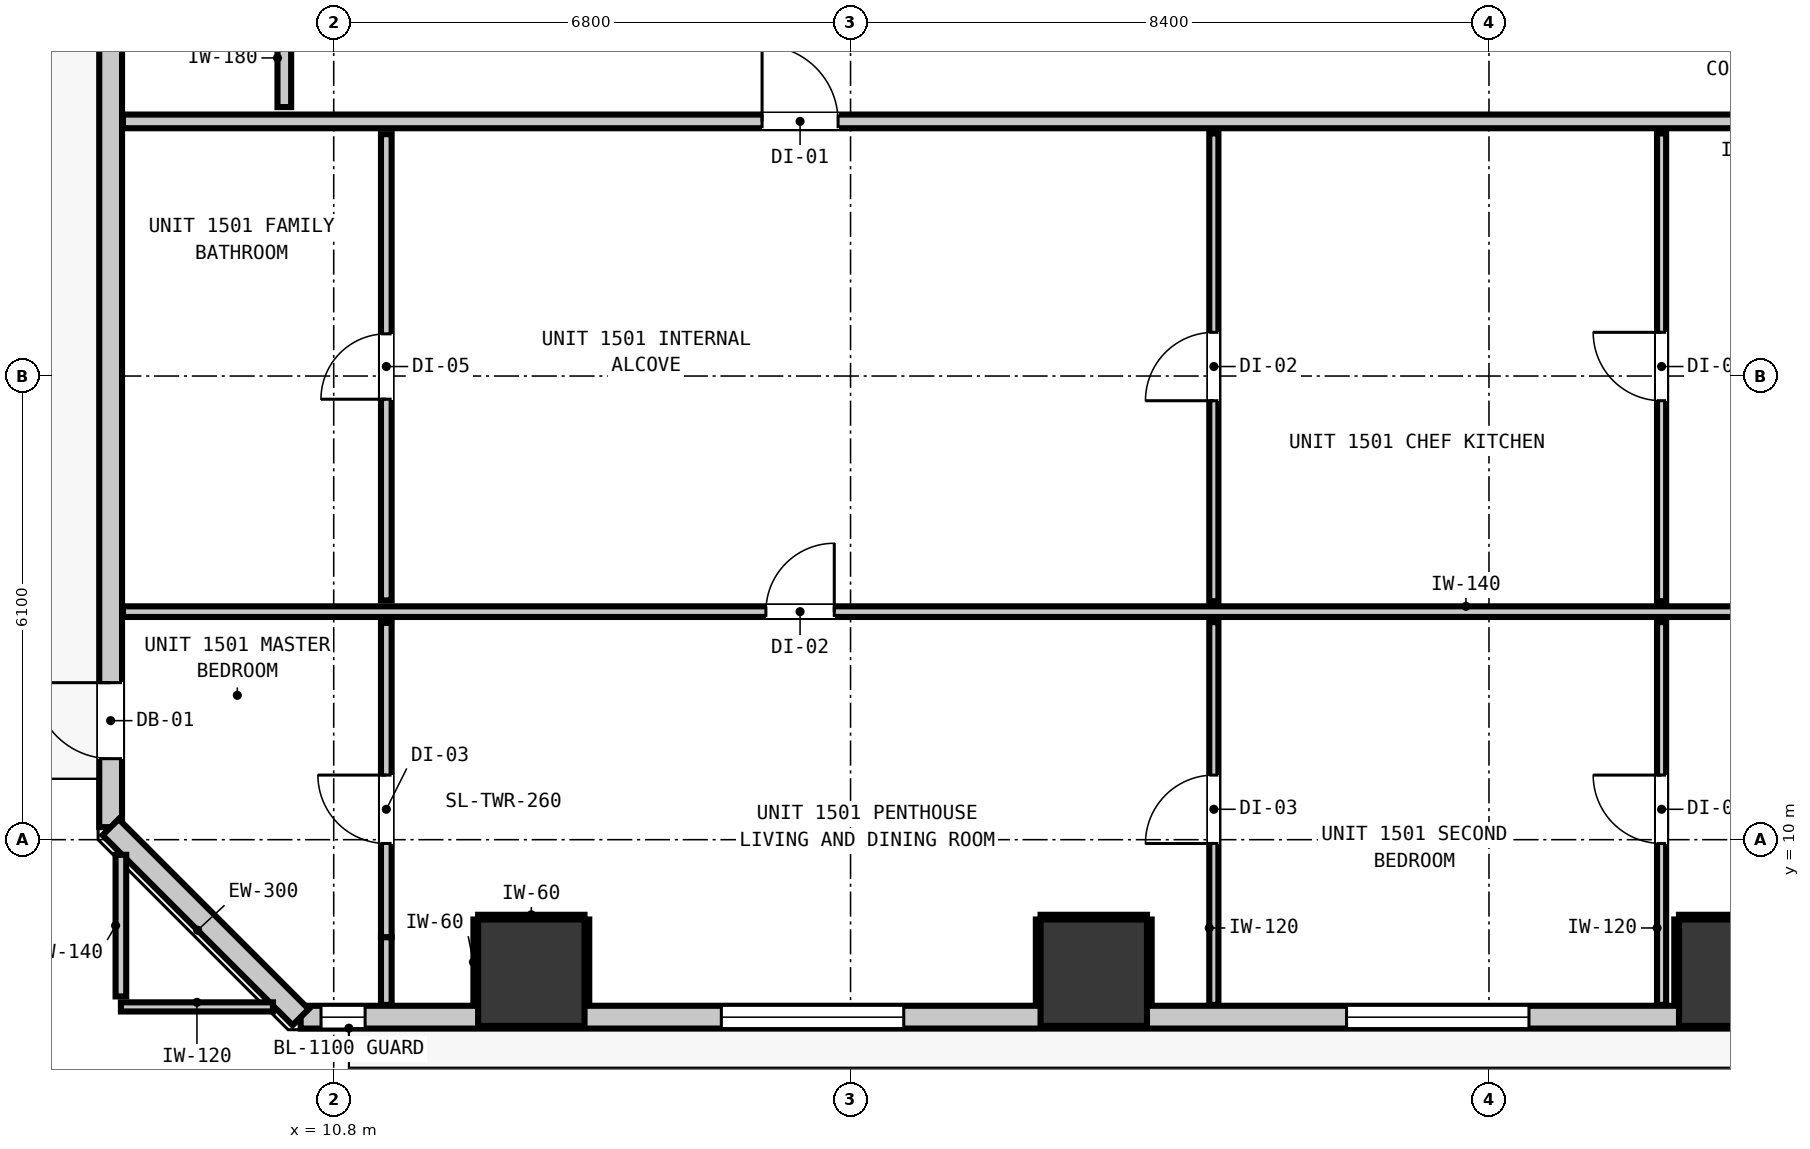
"""IFC4 building model, lengths in metres.
Left out: names, types, materials, properties, quantities, classifications, styles, units other than length and angle.
Written with IfcOpenShell. Run it as: python <this file> out.ifc"""

import sys

from ifc_helpers import new_model, si_unit, direction, frame, frame_2d, origin, origin_2d, place, context, subcontext, project, spatial, rectangle, extrude, element, fill, save


model = new_model("IFC4")
c1 = context("Model", 3, precision=1e-05, world=origin(), true_north=direction((0.0, 1.0)))
c2 = subcontext(c1, "Body", "Model", "MODEL_VIEW")
j1 = project(units=[si_unit("LENGTHUNIT", "METRE"), si_unit("PLANEANGLEUNIT", "RADIAN")], contexts=[c1])
p1 = place(None, origin())
s1 = spatial("IfcSite", under=j1, at=p1, CompositionType="ELEMENT")
p2 = place(p1, origin())
s2 = spatial("IfcBuilding", under=s1, at=p2, CompositionType="ELEMENT")
p3 = place(p2, frame((0.0, 0.0, 55.2)))
s3 = spatial("IfcBuildingStorey", under=s2, at=p3, CompositionType="ELEMENT", Elevation=55.2)
for number, where, z_axis, x_axis in (
    (1, (13.4, 8.25, 0.0), (0.0, 0.0, 1.0), (1.0, 0.0, 0.0)),
    (2, (20.8, 8.25, 0.0), (0.0, 0.0, 1.0), (1.0, 0.0, 0.0)),
    (3, (29.2, 8.25, 0.0), (0.0, 0.0, 1.0), (1.0, 0.0, 0.0)),
):
    element("IfcColumn", number, at=place(p3, frame(where, z_axis=z_axis, x_axis=x_axis)), inside=s3, PredefinedType="COLUMN", context=c2, shape_type="SweptSolid", body=[
        extrude(rectangle(XDim=1.4, YDim=1.4, at=origin_2d()), origin(), (0.0, 0.0, 1.0), 3.32),
    ])
p4 = place(p3, frame((7.865, 10.165, 0.0), z_axis=(0.0, 0.0, 1.0), x_axis=(0.0, 1.0, 0.0)))
e4 = element("IfcWall", 4, at=p4, inside=s3, PredefinedType="STANDARD", context=c2, shape_type="SweptSolid", body=[
    extrude(rectangle(XDim=34.67, YDim=0.3, at=frame_2d((17.335, 0.0))), origin(), (0.0, 0.0, 1.0), 3.06),
])
p5 = place(p4, frame((0.901, 0.0, 0.0)))
e5 = element("IfcOpeningElement", 5, at=p5, cuts=e4, PredefinedType="OPENING", context=c2, shape_type="SweptSolid", body=[
    extrude(rectangle(XDim=1.0, YDim=2.15, at=frame_2d((0.5, 1.075))), frame((0.0, 0.16, 0.0), z_axis=(0.0, -1.0, 0.0), x_axis=(1.0, 0.0, 0.0)), (0.0, 0.0, 1.0), 0.32),
])
p6 = place(p4, frame((32.708, 0.0, 0.85)))
e6 = element("IfcOpeningElement", 6, at=p6, cuts=e4, PredefinedType="OPENING", context=c2, shape_type="SweptSolid", body=[
    extrude(rectangle(XDim=1.05, YDim=1.65, at=frame_2d((0.525, 0.825))), frame((0.0, 0.16, 0.0), z_axis=(0.0, -1.0, 0.0), x_axis=(1.0, 0.0, 0.0)), (0.0, 0.0, 1.0), 0.32),
])
p7 = place(p3, frame((47.835, 7.665, 0.0), z_axis=(0.0, 0.0, 1.0), x_axis=(-1.0, 0.0, 0.0)))
e7 = element("IfcWall", 7, at=p7, inside=s3, PredefinedType="STANDARD", context=c2, shape_type="SweptSolid", body=[
    extrude(rectangle(XDim=37.47, YDim=0.3, at=frame_2d((18.735, 0.0))), origin(), (0.0, 0.0, 1.0), 3.06),
])
p8 = place(p7, frame((0.901, 0.0, 0.0)))
e8 = element("IfcOpeningElement", 8, at=p8, cuts=e7, PredefinedType="OPENING", context=c2, shape_type="SweptSolid", body=[
    extrude(rectangle(XDim=1.0, YDim=2.15, at=frame_2d((0.5, 1.075))), frame((0.0, 0.16, 0.0), z_axis=(0.0, -1.0, 0.0), x_axis=(1.0, 0.0, 0.0)), (0.0, 0.0, 1.0), 0.32),
])
p9 = place(p7, frame((29.535, 0.0, 0.85)))
e9 = element("IfcOpeningElement", 9, at=p9, cuts=e7, PredefinedType="OPENING", context=c2, shape_type="SweptSolid", body=[
    extrude(rectangle(XDim=2.4, YDim=1.95, at=frame_2d((1.2, 0.975))), frame((0.0, 0.16, 0.0), z_axis=(0.0, -1.0, 0.0), x_axis=(1.0, 0.0, 0.0)), (0.0, 0.0, 1.0), 0.32),
])
p10 = place(p7, frame((36.622, 0.0, 0.85)))
e10 = element("IfcOpeningElement", 10, at=p10, cuts=e7, PredefinedType="OPENING", context=c2, shape_type="SweptSolid", body=[
    extrude(rectangle(XDim=0.58, YDim=1.5, at=frame_2d((0.29, 0.75))), frame((0.0, 0.16, 0.0), z_axis=(0.0, -1.0, 0.0), x_axis=(1.0, 0.0, 0.0)), (0.0, 0.0, 1.0), 0.32),
])
p11 = place(p7, frame((21.309, 0.0, 0.85)))
e11 = element("IfcOpeningElement", 11, at=p11, cuts=e7, PredefinedType="OPENING", context=c2, shape_type="SweptSolid", body=[
    extrude(rectangle(XDim=2.4, YDim=1.95, at=frame_2d((1.2, 0.975))), frame((0.0, 0.16, 0.0), z_axis=(0.0, -1.0, 0.0), x_axis=(1.0, 0.0, 0.0)), (0.0, 0.0, 1.0), 0.32),
])
p12 = place(p7, frame((14.781, 0.0, 0.85)))
e12 = element("IfcOpeningElement", 12, at=p12, cuts=e7, PredefinedType="OPENING", context=c2, shape_type="SweptSolid", body=[
    extrude(rectangle(XDim=2.4, YDim=1.95, at=frame_2d((1.2, 0.975))), frame((0.0, 0.16, 0.0), z_axis=(0.0, -1.0, 0.0), x_axis=(1.0, 0.0, 0.0)), (0.0, 0.0, 1.0), 0.32),
])
p13 = place(p7, frame((5.168, 0.0, 0.85)))
e13 = element("IfcOpeningElement", 13, at=p13, cuts=e7, PredefinedType="OPENING", context=c2, shape_type="SweptSolid", body=[
    extrude(rectangle(XDim=2.4, YDim=1.95, at=frame_2d((1.2, 0.975))), frame((0.0, 0.16, 0.0), z_axis=(0.0, -1.0, 0.0), x_axis=(1.0, 0.0, 0.0)), (0.0, 0.0, 1.0), 0.32),
])
p14 = place(p3, frame((10.365, 7.665, 0.0), z_axis=(0.0, 0.0, 1.0), x_axis=(-0.707106781187, 0.707106781187, 0.0)))
e14 = element("IfcWall", 14, at=p14, inside=s3, PredefinedType="STANDARD", context=c2, shape_type="SweptSolid", body=[
    extrude(rectangle(XDim=3.536, YDim=0.3, at=frame_2d((1.768, 0.0))), origin(), (0.0, 0.0, 1.0), 3.06),
])
p15 = place(p3, frame((8.027, 19.45, 0.0), z_axis=(0.0, 0.0, 1.0), x_axis=(1.0, 0.0, 0.0)))
e15 = element("IfcWall", 15, at=p15, inside=s3, PredefinedType="PARTITIONING", context=c2, shape_type="SweptSolid", body=[
    extrude(rectangle(XDim=42.146, YDim=0.18, at=frame_2d((21.073, 0.0))), origin(), (0.0, 0.0, 1.0), 3.06),
])
p16 = place(p15, frame((8.409, 0.0, 0.0)))
e16 = element("IfcOpeningElement", 16, at=p16, cuts=e15, PredefinedType="OPENING", context=c2, shape_type="SweptSolid", body=[
    extrude(rectangle(XDim=1.0, YDim=2.15, at=frame_2d((0.5, 1.075))), frame((0.0, 0.1, 0.0), z_axis=(0.0, -1.0, 0.0), x_axis=(1.0, 0.0, 0.0)), (0.0, 0.0, 1.0), 0.2),
])
p17 = place(p15, frame((33.553, 0.0, 0.0)))
e17 = element("IfcOpeningElement", 17, at=p17, cuts=e15, PredefinedType="OPENING", context=c2, shape_type="SweptSolid", body=[
    extrude(rectangle(XDim=0.9, YDim=2.1, at=frame_2d((0.45, 1.05))), frame((0.0, 0.1, 0.0), z_axis=(0.0, -1.0, 0.0), x_axis=(1.0, 0.0, 0.0)), (0.0, 0.0, 1.0), 0.2),
])
p18 = place(p3, frame((8.027, 13.0, 0.0), z_axis=(0.0, 0.0, 1.0), x_axis=(1.0, 0.0, 0.0)))
e18 = element("IfcWall", 18, at=p18, inside=s3, PredefinedType="PARTITIONING", context=c2, shape_type="SweptSolid", body=[
    extrude(rectangle(XDim=25.881, YDim=0.14, at=frame_2d((12.94, 0.0))), origin(), (0.0, 0.0, 1.0), 3.06),
])
p19 = place(p18, frame((8.459, 0.0, 0.0)))
e19 = element("IfcOpeningElement", 19, at=p19, cuts=e18, PredefinedType="OPENING", context=c2, shape_type="SweptSolid", body=[
    extrude(rectangle(XDim=0.9, YDim=2.1, at=frame_2d((0.45, 1.05))), frame((0.0, 0.08, 0.0), z_axis=(0.0, -1.0, 0.0), x_axis=(1.0, 0.0, 0.0)), (0.0, 0.0, 1.0), 0.16),
])
p20 = place(p3, frame((8.0, 7.8, 0.0), z_axis=(0.0, 0.0, 1.0), x_axis=(1.0, 0.0, 0.0)))
e20 = element("IfcWall", 20, at=p20, inside=s3, PredefinedType="PARTITIONING", context=c2, shape_type="SweptSolid", body=[
    extrude(rectangle(XDim=2.001, YDim=0.12, at=frame_2d((1.0, 0.0))), origin(), (0.0, 0.0, 1.0), 3.06),
])
p21 = place(p3, frame((10.15, 19.638, 0.0), z_axis=(0.0, 0.0, 1.0), x_axis=(0.0, 1.0, 0.0)))
e21 = element("IfcWall", 21, at=p21, inside=s3, PredefinedType="PARTITIONING", context=c2, shape_type="SweptSolid", body=[
    extrude(rectangle(XDim=1.294, YDim=0.18, at=frame_2d((0.647, 0.0))), origin(), (0.0, 0.0, 1.0), 3.06),
])
p22 = place(p3, frame((8.0, 7.938, 0.0), z_axis=(0.0, 0.0, 1.0), x_axis=(0.0, 1.0, 0.0)))
e22 = element("IfcWall", 22, at=p22, inside=s3, PredefinedType="PARTITIONING", context=c2, shape_type="SweptSolid", body=[
    extrude(rectangle(XDim=1.863, YDim=0.14, at=frame_2d((0.932, 0.0))), origin(), (0.0, 0.0, 1.0), 3.06),
])
p23 = place(p3, frame((11.492, 7.827, 0.0), z_axis=(0.0, 0.0, 1.0), x_axis=(0.0, 1.0, 0.0)))
e23 = element("IfcWall", 23, at=p23, inside=s3, PredefinedType="PARTITIONING", context=c2, shape_type="SweptSolid", body=[
    extrude(rectangle(XDim=0.891, YDim=0.14, at=frame_2d((0.446, 0.0))), origin(), (0.0, 0.0, 1.0), 3.06),
])
p24 = place(p3, frame((11.492, 8.718, 0.0), z_axis=(0.0, 0.0, 1.0), x_axis=(0.0, 1.0, 0.0)))
e24 = element("IfcWall", 24, at=p24, inside=s3, PredefinedType="PARTITIONING", context=c2, shape_type="SweptSolid", body=[
    extrude(rectangle(XDim=4.134, YDim=0.14, at=frame_2d((2.067, 0.0))), origin(), (0.0, 0.0, 1.0), 2.445),
])
p25 = place(p24, frame((1.232, 0.0, 0.0)))
e25 = element("IfcOpeningElement", 25, at=p25, cuts=e24, PredefinedType="OPENING", context=c2, shape_type="SweptSolid", body=[
    extrude(rectangle(XDim=0.9, YDim=2.1, at=frame_2d((0.45, 1.05))), frame((0.0, 0.08, 0.0), z_axis=(0.0, -1.0, 0.0), x_axis=(1.0, 0.0, 0.0)), (0.0, 0.0, 1.0), 0.16),
])
p26 = place(p3, frame((11.492, 13.148, 0.0), z_axis=(0.0, 0.0, 1.0), x_axis=(0.0, 1.0, 0.0)))
e26 = element("IfcWall", 26, at=p26, inside=s3, PredefinedType="PARTITIONING", context=c2, shape_type="SweptSolid", body=[
    extrude(rectangle(XDim=6.134, YDim=0.14, at=frame_2d((3.067, 0.0))), origin(), (0.0, 0.0, 1.0), 2.445),
])
p27 = place(p26, frame((2.647, 0.0, 0.0)))
e27 = element("IfcOpeningElement", 27, at=p27, cuts=e26, PredefinedType="OPENING", context=c2, shape_type="SweptSolid", body=[
    extrude(rectangle(XDim=0.86, YDim=2.02, at=frame_2d((0.43, 1.01))), frame((0.0, 0.08, 0.0), z_axis=(0.0, -1.0, 0.0), x_axis=(1.0, 0.0, 0.0)), (0.0, 0.0, 1.0), 0.16),
])
p28 = place(p3, frame((22.38, 7.827, 0.0), z_axis=(0.0, 0.0, 1.0), x_axis=(0.0, 1.0, 0.0)))
e28 = element("IfcWall", 28, at=p28, inside=s3, PredefinedType="PARTITIONING", context=c2, shape_type="SweptSolid", body=[
    extrude(rectangle(XDim=5.035, YDim=0.12, at=frame_2d((2.518, 0.0))), origin(), (0.0, 0.0, 1.0), 3.06),
])
p29 = place(p28, frame((2.123, 0.0, 0.0)))
e29 = element("IfcOpeningElement", 29, at=p29, cuts=e28, PredefinedType="OPENING", context=c2, shape_type="SweptSolid", body=[
    extrude(rectangle(XDim=0.9, YDim=2.1, at=frame_2d((0.45, 1.05))), frame((0.0, 0.07, 0.0), z_axis=(0.0, -1.0, 0.0), x_axis=(1.0, 0.0, 0.0)), (0.0, 0.0, 1.0), 0.14),
])
p30 = place(p3, frame((22.38, 13.138, 0.0), z_axis=(0.0, 0.0, 1.0), x_axis=(0.0, 1.0, 0.0)))
e30 = element("IfcWall", 30, at=p30, inside=s3, PredefinedType="PARTITIONING", context=c2, shape_type="SweptSolid", body=[
    extrude(rectangle(XDim=6.154, YDim=0.12, at=frame_2d((3.077, 0.0))), origin(), (0.0, 0.0, 1.0), 3.06),
])
p31 = place(p30, frame((2.637, 0.0, 0.0)))
e31 = element("IfcOpeningElement", 31, at=p31, cuts=e30, PredefinedType="OPENING", context=c2, shape_type="SweptSolid", body=[
    extrude(rectangle(XDim=0.9, YDim=2.1, at=frame_2d((0.45, 1.05))), frame((0.0, 0.07, 0.0), z_axis=(0.0, -1.0, 0.0), x_axis=(1.0, 0.0, 0.0)), (0.0, 0.0, 1.0), 0.14),
])
p32 = place(p3, frame((28.271, 7.827, 0.0), z_axis=(0.0, 0.0, 1.0), x_axis=(0.0, 1.0, 0.0)))
e32 = element("IfcWall", 32, at=p32, inside=s3, PredefinedType="PARTITIONING", context=c2, shape_type="SweptSolid", body=[
    extrude(rectangle(XDim=5.035, YDim=0.12, at=frame_2d((2.518, 0.0))), origin(), (0.0, 0.0, 1.0), 3.06),
])
p33 = place(p32, frame((2.123, 0.0, 0.0)))
e33 = element("IfcOpeningElement", 33, at=p33, cuts=e32, PredefinedType="OPENING", context=c2, shape_type="SweptSolid", body=[
    extrude(rectangle(XDim=0.9, YDim=2.1, at=frame_2d((0.45, 1.05))), frame((0.0, 0.07, 0.0), z_axis=(0.0, -1.0, 0.0), x_axis=(1.0, 0.0, 0.0)), (0.0, 0.0, 1.0), 0.14),
])
p34 = place(p3, frame((28.271, 13.138, 0.0), z_axis=(0.0, 0.0, 1.0), x_axis=(0.0, 1.0, 0.0)))
e34 = element("IfcWall", 34, at=p34, inside=s3, PredefinedType="PARTITIONING", context=c2, shape_type="SweptSolid", body=[
    extrude(rectangle(XDim=6.154, YDim=0.12, at=frame_2d((3.077, 0.0))), origin(), (0.0, 0.0, 1.0), 3.06),
])
p35 = place(p34, frame((2.637, 0.0, 0.0)))
e35 = element("IfcOpeningElement", 35, at=p35, cuts=e34, PredefinedType="OPENING", context=c2, shape_type="SweptSolid", body=[
    extrude(rectangle(XDim=0.9, YDim=2.1, at=frame_2d((0.45, 1.05))), frame((0.0, 0.07, 0.0), z_axis=(0.0, -1.0, 0.0), x_axis=(1.0, 0.0, 0.0)), (0.0, 0.0, 1.0), 0.14),
])
p36 = place(p3, frame((12.7, 8.982, 0.0), z_axis=(0.0, 0.0, 1.0), x_axis=(1.0, 0.0, 0.0)))
e36 = element("IfcWall", 36, at=p36, inside=s3, PredefinedType="PARTITIONING", context=c2, shape_type="SweptSolid", body=[
    extrude(rectangle(XDim=1.4, YDim=0.06, at=frame_2d((0.7, 0.0))), origin(), (0.0, 0.0, 1.0), 1.45),
])
for number, where, z_axis, x_axis in (
    (37, (12.668, 7.83, 0.0), (0.0, 0.0, 1.0), (0.0, 1.0, 0.0)),
    (38, (14.132, 7.83, 0.0), (0.0, 0.0, 1.0), (0.0, 1.0, 0.0)),
):
    element("IfcWall", number, at=place(p3, frame(where, z_axis=z_axis, x_axis=x_axis)), inside=s3, PredefinedType="PARTITIONING", context=c2, shape_type="SweptSolid", body=[
        extrude(rectangle(XDim=1.12, YDim=0.06, at=frame_2d((0.56, 0.0))), origin(), (0.0, 0.0, 1.0), 1.45),
    ])
p37 = place(p3, frame((20.1, 8.982, 0.0), z_axis=(0.0, 0.0, 1.0), x_axis=(1.0, 0.0, 0.0)))
e39 = element("IfcWall", 39, at=p37, inside=s3, PredefinedType="PARTITIONING", context=c2, shape_type="SweptSolid", body=[
    extrude(rectangle(XDim=1.4, YDim=0.06, at=frame_2d((0.7, 0.0))), origin(), (0.0, 0.0, 1.0), 1.45),
])
for number, where, z_axis, x_axis in (
    (40, (20.068, 7.83, 0.0), (0.0, 0.0, 1.0), (0.0, 1.0, 0.0)),
    (41, (21.532, 7.83, 0.0), (0.0, 0.0, 1.0), (0.0, 1.0, 0.0)),
):
    element("IfcWall", number, at=place(p3, frame(where, z_axis=z_axis, x_axis=x_axis)), inside=s3, PredefinedType="PARTITIONING", context=c2, shape_type="SweptSolid", body=[
        extrude(rectangle(XDim=1.12, YDim=0.06, at=frame_2d((0.56, 0.0))), origin(), (0.0, 0.0, 1.0), 1.45),
    ])
p38 = place(p3, frame((28.5, 8.982, 0.0), z_axis=(0.0, 0.0, 1.0), x_axis=(1.0, 0.0, 0.0)))
e42 = element("IfcWall", 42, at=p38, inside=s3, PredefinedType="PARTITIONING", context=c2, shape_type="SweptSolid", body=[
    extrude(rectangle(XDim=1.4, YDim=0.06, at=frame_2d((0.7, 0.0))), origin(), (0.0, 0.0, 1.0), 1.45),
])
p39 = place(p3, frame((28.468, 7.83, 0.0), z_axis=(0.0, 0.0, 1.0), x_axis=(0.0, 1.0, 0.0)))
e43 = element("IfcWall", 43, at=p39, inside=s3, PredefinedType="PARTITIONING", context=c2, shape_type="SweptSolid", body=[
    extrude(rectangle(XDim=1.12, YDim=0.06, at=frame_2d((0.56, 0.0))), origin(), (0.0, 0.0, 1.0), 1.45),
])
p40 = place(p5, origin())
e44 = element("IfcDoor", 44, at=p40, inside=s3, OperationType="SINGLE_SWING_RIGHT", PredefinedType="DOOR", context=c2, shape_type="SweptSolid", body=[
    extrude(rectangle(XDim=1.0, YDim=2.15, at=frame_2d((0.5, 1.075))), frame((0.0, 0.025, 0.0), z_axis=(0.0, -1.0, 0.0), x_axis=(1.0, 0.0, 0.0)), (0.0, 0.0, 1.0), 0.05),
])
fill(e5, e44)
p41 = place(p9, origin())
e45 = element("IfcWindow", 45, at=p41, inside=s3, PartitioningType="SINGLE_PANEL", PredefinedType="WINDOW", context=c2, shape_type="SweptSolid", body=[
    extrude(rectangle(XDim=2.4, YDim=1.95, at=frame_2d((1.2, 0.975))), frame((0.0, 0.03, 0.0), z_axis=(0.0, -1.0, 0.0), x_axis=(1.0, 0.0, 0.0)), (0.0, 0.0, 1.0), 0.06),
])
fill(e9, e45)
p42 = place(p10, origin())
e46 = element("IfcWindow", 46, at=p42, inside=s3, PartitioningType="SINGLE_PANEL", PredefinedType="WINDOW", context=c2, shape_type="SweptSolid", body=[
    extrude(rectangle(XDim=0.58, YDim=1.5, at=frame_2d((0.29, 0.75))), frame((0.0, 0.03, 0.0), z_axis=(0.0, -1.0, 0.0), x_axis=(1.0, 0.0, 0.0)), (0.0, 0.0, 1.0), 0.06),
])
fill(e10, e46)
p43 = place(p11, origin())
e47 = element("IfcWindow", 47, at=p43, inside=s3, PartitioningType="SINGLE_PANEL", PredefinedType="WINDOW", context=c2, shape_type="SweptSolid", body=[
    extrude(rectangle(XDim=2.4, YDim=1.95, at=frame_2d((1.2, 0.975))), frame((0.0, 0.03, 0.0), z_axis=(0.0, -1.0, 0.0), x_axis=(1.0, 0.0, 0.0)), (0.0, 0.0, 1.0), 0.06),
])
fill(e11, e47)
p44 = place(p16, origin())
e48 = element("IfcDoor", 48, at=p44, inside=s3, OperationType="SINGLE_SWING_LEFT", PredefinedType="DOOR", context=c2, shape_type="SweptSolid", body=[
    extrude(rectangle(XDim=1.0, YDim=2.15, at=frame_2d((0.5, 1.075))), frame((0.0, 0.025, 0.0), z_axis=(0.0, -1.0, 0.0), x_axis=(1.0, 0.0, 0.0)), (0.0, 0.0, 1.0), 0.05),
])
fill(e16, e48)
p45 = place(p19, origin())
e49 = element("IfcDoor", 49, at=p45, inside=s3, OperationType="SINGLE_SWING_RIGHT", PredefinedType="DOOR", context=c2, shape_type="SweptSolid", body=[
    extrude(rectangle(XDim=0.9, YDim=2.1, at=frame_2d((0.45, 1.05))), frame((0.0, 0.025, 0.0), z_axis=(0.0, -1.0, 0.0), x_axis=(1.0, 0.0, 0.0)), (0.0, 0.0, 1.0), 0.05),
])
fill(e19, e49)
p46 = place(p27, origin())
e50 = element("IfcDoor", 50, at=p46, inside=s3, OperationType="SINGLE_SWING_LEFT", PredefinedType="DOOR", context=c2, shape_type="SweptSolid", body=[
    extrude(rectangle(XDim=0.86, YDim=2.02, at=frame_2d((0.43, 1.01))), frame((0.0, 0.025, 0.0), z_axis=(0.0, -1.0, 0.0), x_axis=(1.0, 0.0, 0.0)), (0.0, 0.0, 1.0), 0.05),
])
fill(e27, e50)
p47 = place(p25, origin())
e51 = element("IfcDoor", 51, at=p47, inside=s3, OperationType="SINGLE_SWING_RIGHT", PredefinedType="DOOR", context=c2, shape_type="SweptSolid", body=[
    extrude(rectangle(XDim=0.9, YDim=2.1, at=frame_2d((0.45, 1.05))), frame((0.0, 0.025, 0.0), z_axis=(0.0, -1.0, 0.0), x_axis=(1.0, 0.0, 0.0)), (0.0, 0.0, 1.0), 0.05),
])
fill(e25, e51)
p48 = place(p31, origin())
e52 = element("IfcDoor", 52, at=p48, inside=s3, OperationType="SINGLE_SWING_LEFT", PredefinedType="DOOR", context=c2, shape_type="SweptSolid", body=[
    extrude(rectangle(XDim=0.9, YDim=2.1, at=frame_2d((0.45, 1.05))), frame((0.0, 0.025, 0.0), z_axis=(0.0, -1.0, 0.0), x_axis=(1.0, 0.0, 0.0)), (0.0, 0.0, 1.0), 0.05),
])
fill(e31, e52)
p49 = place(p35, origin())
e53 = element("IfcDoor", 53, at=p49, inside=s3, OperationType="SINGLE_SWING_RIGHT", PredefinedType="DOOR", context=c2, shape_type="SweptSolid", body=[
    extrude(rectangle(XDim=0.9, YDim=2.1, at=frame_2d((0.45, 1.05))), frame((0.0, 0.025, 0.0), z_axis=(0.0, -1.0, 0.0), x_axis=(1.0, 0.0, 0.0)), (0.0, 0.0, 1.0), 0.05),
])
fill(e35, e53)
p50 = place(p29, origin())
e54 = element("IfcDoor", 54, at=p50, inside=s3, OperationType="SINGLE_SWING_LEFT", PredefinedType="DOOR", context=c2, shape_type="SweptSolid", body=[
    extrude(rectangle(XDim=0.9, YDim=2.1, at=frame_2d((0.45, 1.05))), frame((0.0, 0.025, 0.0), z_axis=(0.0, -1.0, 0.0), x_axis=(1.0, 0.0, 0.0)), (0.0, 0.0, 1.0), 0.05),
])
fill(e29, e54)
p51 = place(p33, origin())
e55 = element("IfcDoor", 55, at=p51, inside=s3, OperationType="SINGLE_SWING_RIGHT", PredefinedType="DOOR", context=c2, shape_type="SweptSolid", body=[
    extrude(rectangle(XDim=0.9, YDim=2.1, at=frame_2d((0.45, 1.05))), frame((0.0, 0.025, 0.0), z_axis=(0.0, -1.0, 0.0), x_axis=(1.0, 0.0, 0.0)), (0.0, 0.0, 1.0), 0.05),
])
fill(e33, e55)
save(model, sys.argv[1])
